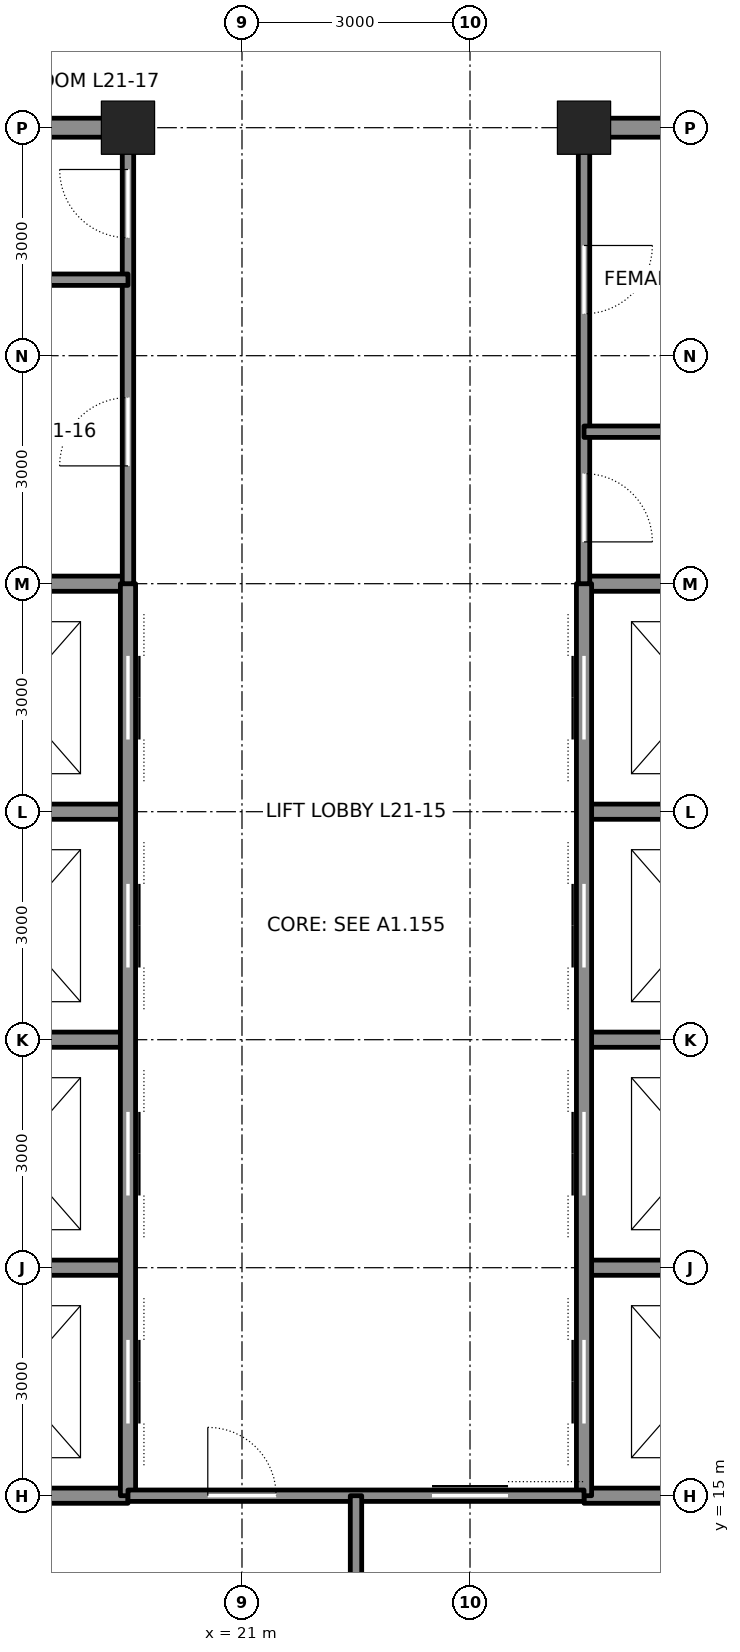
"""IFC4 building model, lengths in metres.
Left out: names, types, materials, properties, quantities, classifications, styles, units other than length and angle.
Written with IfcOpenShell. Run it as: python <this file> out.ifc"""

import sys

from ifc_helpers import new_model, si_unit, direction, frame, frame_2d, origin, origin_2d, place, context, subcontext, project, spatial, rectangle, hollow_rectangle, extrude, element, fill, save


model = new_model("IFC4")
c1 = context("Model", 3, precision=1e-05, world=origin(), true_north=direction((0.0, 1.0)))
c2 = subcontext(c1, "Body", "Model", "MODEL_VIEW")
j1 = project(units=[si_unit("LENGTHUNIT", "METRE"), si_unit("PLANEANGLEUNIT", "RADIAN")], contexts=[c1])
p1 = place(None, origin())
s1 = spatial("IfcSite", under=j1, at=p1, CompositionType="ELEMENT")
p2 = place(p1, origin())
s2 = spatial("IfcBuilding", under=s1, at=p2, CompositionType="ELEMENT")
p3 = place(p2, frame((0.0, 0.0, 102.3)))
s3 = spatial("IfcBuildingStorey", under=s2, at=p3, CompositionType="ELEMENT", Elevation=102.3)
for number, where, z_axis, x_axis in (
    (1, (19.5, 33.0, 0.0), (0.0, 0.0, 1.0), (1.0, 0.0, 0.0)),
    (2, (25.5, 33.0, 0.0), (0.0, 0.0, 1.0), (1.0, 0.0, 0.0)),
):
    element("IfcColumn", number, at=place(p3, frame(where, z_axis=z_axis, x_axis=x_axis)), inside=s3, PredefinedType="COLUMN", context=c2, shape_type="SweptSolid", body=[
        extrude(hollow_rectangle(XDim=0.7, YDim=0.7, WallThickness=0.07, at=origin_2d()), origin(), (0.0, 0.0, 1.0), 4.5),
    ])
for number, where, z_axis, x_axis in (
    (3, (12.0, 15.0, 0.0), (0.0, 0.0, 1.0), (1.0, 0.0, 0.0)),
    (4, (25.5, 15.0, 0.0), (0.0, 0.0, 1.0), (1.0, 0.0, 0.0)),
):
    element("IfcWall", number, at=place(p3, frame(where, z_axis=z_axis, x_axis=x_axis)), inside=s3, PredefinedType="SOLIDWALL", context=c2, shape_type="SweptSolid", body=[
        extrude(rectangle(XDim=7.5, YDim=0.2, at=frame_2d((3.75, 0.0))), origin(), (0.0, 0.0, 1.0), 4.34),
    ])
for number, where, z_axis, x_axis in (
    (5, (16.75, 24.0, 0.0), (0.0, 0.0, 1.0), (1.0, 0.0, 0.0)),
    (6, (25.5, 24.0, 0.0), (0.0, 0.0, 1.0), (1.0, 0.0, 0.0)),
):
    element("IfcWall", number, at=place(p3, frame(where, z_axis=z_axis, x_axis=x_axis)), inside=s3, PredefinedType="SOLIDWALL", context=c2, shape_type="SweptSolid", body=[
        extrude(rectangle(XDim=2.75, YDim=0.2, at=frame_2d((1.375, 0.0))), origin(), (0.0, 0.0, 1.0), 3.39),
    ])
p4 = place(p3, frame((12.0, 27.0, 0.0), z_axis=(0.0, 0.0, 1.0), x_axis=(1.0, 0.0, 0.0)))
e7 = element("IfcWall", 7, at=p4, inside=s3, PredefinedType="SOLIDWALL", context=c2, shape_type="SweptSolid", body=[
    extrude(rectangle(XDim=7.5, YDim=0.2, at=frame_2d((3.75, 0.0))), origin(), (0.0, 0.0, 1.0), 4.34),
])
p5 = place(p4, frame((1.65, 0.0, 0.0)))
e8 = element("IfcOpeningElement", 8, at=p5, cuts=e7, PredefinedType="OPENING", context=c2, shape_type="SweptSolid", body=[
    extrude(rectangle(XDim=1.2, YDim=2.1, at=frame_2d((0.6, 1.05))), frame((0.0, 0.11, 0.0), z_axis=(0.0, -1.0, 0.0), x_axis=(1.0, 0.0, 0.0)), (0.0, 0.0, 1.0), 0.22),
])
p6 = place(p3, frame((25.5, 27.0, 0.0), z_axis=(0.0, 0.0, 1.0), x_axis=(1.0, 0.0, 0.0)))
e9 = element("IfcWall", 9, at=p6, inside=s3, PredefinedType="SOLIDWALL", context=c2, shape_type="SweptSolid", body=[
    extrude(rectangle(XDim=3.0, YDim=0.2, at=frame_2d((1.5, 0.0))), origin(), (0.0, 0.0, 1.0), 4.34),
])
for number, where, z_axis, x_axis in (
    (10, (16.75, 33.0, 0.0), (0.0, 0.0, 1.0), (1.0, 0.0, 0.0)),
    (11, (25.75, 33.0, 0.0), (0.0, 0.0, 1.0), (1.0, 0.0, 0.0)),
):
    element("IfcWall", number, at=place(p3, frame(where, z_axis=z_axis, x_axis=x_axis)), inside=s3, PredefinedType="SOLIDWALL", context=c2, shape_type="SweptSolid", body=[
        extrude(rectangle(XDim=2.5, YDim=0.25, at=frame_2d((1.25, 0.0))), origin(), (0.0, 0.0, 1.0), 3.481),
    ])
p7 = place(p3, frame((16.5, 18.0, 0.0), z_axis=(0.0, 0.0, 1.0), x_axis=(1.0, 0.0, 0.0)))
e12 = element("IfcWall", 12, at=p7, inside=s3, PredefinedType="SOLIDWALL", context=c2, shape_type="SweptSolid", body=[
    extrude(rectangle(XDim=3.0, YDim=0.2, at=frame_2d((1.5, 0.0))), origin(), (0.0, 0.0, 1.0), 4.34),
])
p8 = place(p3, frame((25.5, 18.0, 0.0), z_axis=(0.0, 0.0, 1.0), x_axis=(1.0, 0.0, 0.0)))
e13 = element("IfcWall", 13, at=p8, inside=s3, PredefinedType="SOLIDWALL", context=c2, shape_type="SweptSolid", body=[
    extrude(rectangle(XDim=7.5, YDim=0.2, at=frame_2d((3.75, 0.0))), origin(), (0.0, 0.0, 1.0), 4.34),
])
p9 = place(p8, frame((4.65, 0.0, 0.0)))
e14 = element("IfcOpeningElement", 14, at=p9, cuts=e13, PredefinedType="OPENING", context=c2, shape_type="SweptSolid", body=[
    extrude(rectangle(XDim=1.2, YDim=2.1, at=frame_2d((0.6, 1.05))), frame((0.0, 0.11, 0.0), z_axis=(0.0, -1.0, 0.0), x_axis=(1.0, 0.0, 0.0)), (0.0, 0.0, 1.0), 0.22),
])
for number, where, z_axis, x_axis in (
    (15, (16.75, 21.0, 0.0), (0.0, 0.0, 1.0), (1.0, 0.0, 0.0)),
    (16, (25.5, 21.0, 0.0), (0.0, 0.0, 1.0), (1.0, 0.0, 0.0)),
):
    element("IfcWall", number, at=place(p3, frame(where, z_axis=z_axis, x_axis=x_axis)), inside=s3, PredefinedType="SOLIDWALL", context=c2, shape_type="SweptSolid", body=[
        extrude(rectangle(XDim=2.75, YDim=0.2, at=frame_2d((1.375, 0.0))), origin(), (0.0, 0.0, 1.0), 3.39),
    ])
p10 = place(p3, frame((19.5, 15.0, 0.0), z_axis=(0.0, 0.0, 1.0), x_axis=(0.0, 1.0, 0.0)))
e17 = element("IfcWall", 17, at=p10, inside=s3, PredefinedType="SOLIDWALL", context=c2, shape_type="SweptSolid", body=[
    extrude(rectangle(XDim=12.0, YDim=0.2, at=frame_2d((6.0, 0.0))), origin(), (0.0, 0.0, 1.0), 3.365),
])
p11 = place(p10, frame((0.95, 0.0, 0.0)))
e18 = element("IfcOpeningElement", 18, at=p11, cuts=e17, PredefinedType="OPENING", context=c2, shape_type="SweptSolid", body=[
    extrude(rectangle(XDim=1.1, YDim=2.1, at=frame_2d((0.55, 1.05))), frame((0.0, 0.11, 0.0), z_axis=(0.0, -1.0, 0.0), x_axis=(1.0, 0.0, 0.0)), (0.0, 0.0, 1.0), 0.22),
])
p12 = place(p10, frame((3.95, 0.0, 0.0)))
e19 = element("IfcOpeningElement", 19, at=p12, cuts=e17, PredefinedType="OPENING", context=c2, shape_type="SweptSolid", body=[
    extrude(rectangle(XDim=1.1, YDim=2.1, at=frame_2d((0.55, 1.05))), frame((0.0, 0.11, 0.0), z_axis=(0.0, -1.0, 0.0), x_axis=(1.0, 0.0, 0.0)), (0.0, 0.0, 1.0), 0.22),
])
p13 = place(p10, frame((6.95, 0.0, 0.0)))
e20 = element("IfcOpeningElement", 20, at=p13, cuts=e17, PredefinedType="OPENING", context=c2, shape_type="SweptSolid", body=[
    extrude(rectangle(XDim=1.1, YDim=2.1, at=frame_2d((0.55, 1.05))), frame((0.0, 0.11, 0.0), z_axis=(0.0, -1.0, 0.0), x_axis=(1.0, 0.0, 0.0)), (0.0, 0.0, 1.0), 0.22),
])
p14 = place(p10, frame((9.95, 0.0, 0.0)))
e21 = element("IfcOpeningElement", 21, at=p14, cuts=e17, PredefinedType="OPENING", context=c2, shape_type="SweptSolid", body=[
    extrude(rectangle(XDim=1.1, YDim=2.1, at=frame_2d((0.55, 1.05))), frame((0.0, 0.11, 0.0), z_axis=(0.0, -1.0, 0.0), x_axis=(1.0, 0.0, 0.0)), (0.0, 0.0, 1.0), 0.22),
])
p15 = place(p3, frame((19.5, 27.0, 0.0), z_axis=(0.0, 0.0, 1.0), x_axis=(0.0, 1.0, 0.0)))
e22 = element("IfcWall", 22, at=p15, inside=s3, PredefinedType="PARTITIONING", context=c2, shape_type="SweptSolid", body=[
    extrude(rectangle(XDim=5.75, YDim=0.15, at=frame_2d((2.875, 0.0))), origin(), (0.0, 0.0, 1.0), 3.365),
])
p16 = place(p15, frame((1.55, 0.0, 0.0)))
e23 = element("IfcOpeningElement", 23, at=p16, cuts=e22, PredefinedType="OPENING", context=c2, shape_type="SweptSolid", body=[
    extrude(rectangle(XDim=0.9, YDim=2.1, at=frame_2d((0.45, 1.05))), frame((0.0, 0.085, 0.0), z_axis=(0.0, -1.0, 0.0), x_axis=(1.0, 0.0, 0.0)), (0.0, 0.0, 1.0), 0.17),
])
p17 = place(p15, frame((4.55, 0.0, 0.0)))
e24 = element("IfcOpeningElement", 24, at=p17, cuts=e22, PredefinedType="OPENING", context=c2, shape_type="SweptSolid", body=[
    extrude(rectangle(XDim=0.9, YDim=2.1, at=frame_2d((0.45, 1.05))), frame((0.0, 0.085, 0.0), z_axis=(0.0, -1.0, 0.0), x_axis=(1.0, 0.0, 0.0)), (0.0, 0.0, 1.0), 0.17),
])
p18 = place(p3, frame((25.5, 15.0, 0.0), z_axis=(0.0, 0.0, 1.0), x_axis=(0.0, 1.0, 0.0)))
e25 = element("IfcWall", 25, at=p18, inside=s3, PredefinedType="SOLIDWALL", context=c2, shape_type="SweptSolid", body=[
    extrude(rectangle(XDim=12.0, YDim=0.2, at=frame_2d((6.0, 0.0))), origin(), (0.0, 0.0, 1.0), 3.365),
])
p19 = place(p18, frame((0.95, 0.0, 0.0)))
e26 = element("IfcOpeningElement", 26, at=p19, cuts=e25, PredefinedType="OPENING", context=c2, shape_type="SweptSolid", body=[
    extrude(rectangle(XDim=1.1, YDim=2.1, at=frame_2d((0.55, 1.05))), frame((0.0, 0.11, 0.0), z_axis=(0.0, -1.0, 0.0), x_axis=(1.0, 0.0, 0.0)), (0.0, 0.0, 1.0), 0.22),
])
p20 = place(p18, frame((3.95, 0.0, 0.0)))
e27 = element("IfcOpeningElement", 27, at=p20, cuts=e25, PredefinedType="OPENING", context=c2, shape_type="SweptSolid", body=[
    extrude(rectangle(XDim=1.1, YDim=2.1, at=frame_2d((0.55, 1.05))), frame((0.0, 0.11, 0.0), z_axis=(0.0, -1.0, 0.0), x_axis=(1.0, 0.0, 0.0)), (0.0, 0.0, 1.0), 0.22),
])
p21 = place(p18, frame((6.95, 0.0, 0.0)))
e28 = element("IfcOpeningElement", 28, at=p21, cuts=e25, PredefinedType="OPENING", context=c2, shape_type="SweptSolid", body=[
    extrude(rectangle(XDim=1.1, YDim=2.1, at=frame_2d((0.55, 1.05))), frame((0.0, 0.11, 0.0), z_axis=(0.0, -1.0, 0.0), x_axis=(1.0, 0.0, 0.0)), (0.0, 0.0, 1.0), 0.22),
])
p22 = place(p18, frame((9.95, 0.0, 0.0)))
e29 = element("IfcOpeningElement", 29, at=p22, cuts=e25, PredefinedType="OPENING", context=c2, shape_type="SweptSolid", body=[
    extrude(rectangle(XDim=1.1, YDim=2.1, at=frame_2d((0.55, 1.05))), frame((0.0, 0.11, 0.0), z_axis=(0.0, -1.0, 0.0), x_axis=(1.0, 0.0, 0.0)), (0.0, 0.0, 1.0), 0.22),
])
p23 = place(p3, frame((25.5, 27.0, 0.0), z_axis=(0.0, 0.0, 1.0), x_axis=(0.0, 1.0, 0.0)))
e30 = element("IfcWall", 30, at=p23, inside=s3, PredefinedType="PARTITIONING", context=c2, shape_type="SweptSolid", body=[
    extrude(rectangle(XDim=5.75, YDim=0.15, at=frame_2d((2.875, 0.0))), origin(), (0.0, 0.0, 1.0), 3.365),
])
p24 = place(p23, frame((0.55, 0.0, 0.0)))
e31 = element("IfcOpeningElement", 31, at=p24, cuts=e30, PredefinedType="OPENING", context=c2, shape_type="SweptSolid", body=[
    extrude(rectangle(XDim=0.9, YDim=2.1, at=frame_2d((0.45, 1.05))), frame((0.0, 0.085, 0.0), z_axis=(0.0, -1.0, 0.0), x_axis=(1.0, 0.0, 0.0)), (0.0, 0.0, 1.0), 0.17),
])
p25 = place(p23, frame((3.55, 0.0, 0.0)))
e32 = element("IfcOpeningElement", 32, at=p25, cuts=e30, PredefinedType="OPENING", context=c2, shape_type="SweptSolid", body=[
    extrude(rectangle(XDim=0.9, YDim=2.1, at=frame_2d((0.45, 1.05))), frame((0.0, 0.085, 0.0), z_axis=(0.0, -1.0, 0.0), x_axis=(1.0, 0.0, 0.0)), (0.0, 0.0, 1.0), 0.17),
])
p26 = place(p3, frame((19.5, 15.0, 0.0), z_axis=(0.0, 0.0, 1.0), x_axis=(1.0, 0.0, 0.0)))
e33 = element("IfcWall", 33, at=p26, inside=s3, PredefinedType="PARTITIONING", context=c2, shape_type="SweptSolid", body=[
    extrude(rectangle(XDim=6.0, YDim=0.15, at=frame_2d((3.0, 0.0))), origin(), (0.0, 0.0, 1.0), 4.34),
])
p27 = place(p26, frame((4.0, 0.0, 0.0)))
e34 = element("IfcOpeningElement", 34, at=p27, cuts=e33, PredefinedType="OPENING", context=c2, shape_type="SweptSolid", body=[
    extrude(rectangle(XDim=1.0, YDim=2.1, at=frame_2d((0.5, 1.05))), frame((0.0, 0.085, 0.0), z_axis=(0.0, -1.0, 0.0), x_axis=(1.0, 0.0, 0.0)), (0.0, 0.0, 1.0), 0.17),
])
p28 = place(p26, frame((1.05, 0.0, 0.0)))
e35 = element("IfcOpeningElement", 35, at=p28, cuts=e33, PredefinedType="OPENING", context=c2, shape_type="SweptSolid", body=[
    extrude(rectangle(XDim=0.9, YDim=2.1, at=frame_2d((0.45, 1.05))), frame((0.0, 0.085, 0.0), z_axis=(0.0, -1.0, 0.0), x_axis=(1.0, 0.0, 0.0)), (0.0, 0.0, 1.0), 0.17),
])
for number, where, z_axis, x_axis in (
    (36, (22.5, 15.0, 0.0), (0.0, 0.0, 1.0), (0.0, -1.0, 0.0)),
    (37, (16.5, 31.0, 0.0), (0.0, 0.0, 1.0), (1.0, 0.0, 0.0)),
    (38, (25.5, 29.0, 0.0), (0.0, 0.0, 1.0), (1.0, 0.0, 0.0)),
):
    element("IfcWall", number, at=place(p3, frame(where, z_axis=z_axis, x_axis=x_axis)), inside=s3, PredefinedType="PARTITIONING", context=c2, shape_type="SweptSolid", body=[
        extrude(rectangle(XDim=3.0, YDim=0.15, at=frame_2d((1.5, 0.0))), origin(), (0.0, 0.0, 1.0), 4.34),
    ])
p29 = place(p16, origin())
e39 = element("IfcDoor", 39, at=p29, inside=s3, OperationType="SINGLE_SWING_LEFT", PredefinedType="DOOR", context=c2, shape_type="SweptSolid", body=[
    extrude(rectangle(XDim=0.9, YDim=2.1, at=frame_2d((0.45, 1.05))), frame((0.0, 0.025, 0.0), z_axis=(0.0, -1.0, 0.0), x_axis=(1.0, 0.0, 0.0)), (0.0, 0.0, 1.0), 0.05),
])
fill(e23, e39)
p30 = place(p17, origin())
e40 = element("IfcDoor", 40, at=p30, inside=s3, OperationType="SINGLE_SWING_RIGHT", PredefinedType="DOOR", context=c2, shape_type="SweptSolid", body=[
    extrude(rectangle(XDim=0.9, YDim=2.1, at=frame_2d((0.45, 1.05))), frame((0.0, 0.025, 0.0), z_axis=(0.0, -1.0, 0.0), x_axis=(1.0, 0.0, 0.0)), (0.0, 0.0, 1.0), 0.05),
])
fill(e24, e40)
p31 = place(p24, frame((0.9, 0.0, 0.0), z_axis=(0.0, 0.0, 1.0), x_axis=(-1.0, 0.0, 0.0)))
e41 = element("IfcDoor", 41, at=p31, inside=s3, OperationType="SINGLE_SWING_RIGHT", PredefinedType="DOOR", context=c2, shape_type="SweptSolid", body=[
    extrude(rectangle(XDim=0.9, YDim=2.1, at=frame_2d((0.45, 1.05))), frame((0.0, 0.025, 0.0), z_axis=(0.0, -1.0, 0.0), x_axis=(1.0, 0.0, 0.0)), (0.0, 0.0, 1.0), 0.05),
])
fill(e31, e41)
p32 = place(p25, frame((0.9, 0.0, 0.0), z_axis=(0.0, 0.0, 1.0), x_axis=(-1.0, 0.0, 0.0)))
e42 = element("IfcDoor", 42, at=p32, inside=s3, OperationType="SINGLE_SWING_LEFT", PredefinedType="DOOR", context=c2, shape_type="SweptSolid", body=[
    extrude(rectangle(XDim=0.9, YDim=2.1, at=frame_2d((0.45, 1.05))), frame((0.0, 0.025, 0.0), z_axis=(0.0, -1.0, 0.0), x_axis=(1.0, 0.0, 0.0)), (0.0, 0.0, 1.0), 0.05),
])
fill(e32, e42)
p33 = place(p27, origin())
e43 = element("IfcDoor", 43, at=p33, inside=s3, OperationType="SLIDING_TO_LEFT", PredefinedType="DOOR", context=c2, shape_type="SweptSolid", body=[
    extrude(rectangle(XDim=1.0, YDim=2.1, at=frame_2d((0.5, 1.05))), frame((0.0, 0.025, 0.0), z_axis=(0.0, -1.0, 0.0), x_axis=(1.0, 0.0, 0.0)), (0.0, 0.0, 1.0), 0.05),
])
fill(e34, e43)
p34 = place(p28, origin())
e44 = element("IfcDoor", 44, at=p34, inside=s3, OperationType="SINGLE_SWING_LEFT", PredefinedType="DOOR", context=c2, shape_type="SweptSolid", body=[
    extrude(rectangle(XDim=0.9, YDim=2.1, at=frame_2d((0.45, 1.05))), frame((0.0, 0.025, 0.0), z_axis=(0.0, -1.0, 0.0), x_axis=(1.0, 0.0, 0.0)), (0.0, 0.0, 1.0), 0.05),
])
fill(e35, e44)
p35 = place(p11, origin())
e45 = element("IfcDoor", 45, at=p35, inside=s3, OperationType="DOUBLE_DOOR_SLIDING", PredefinedType="DOOR", context=c2, shape_type="SweptSolid", body=[
    extrude(rectangle(XDim=1.1, YDim=2.1, at=frame_2d((0.55, 1.05))), frame((0.0, 0.025, 0.0), z_axis=(0.0, -1.0, 0.0), x_axis=(1.0, 0.0, 0.0)), (0.0, 0.0, 1.0), 0.05),
])
fill(e18, e45)
p36 = place(p19, origin())
e46 = element("IfcDoor", 46, at=p36, inside=s3, OperationType="DOUBLE_DOOR_SLIDING", PredefinedType="DOOR", context=c2, shape_type="SweptSolid", body=[
    extrude(rectangle(XDim=1.1, YDim=2.1, at=frame_2d((0.55, 1.05))), frame((0.0, 0.025, 0.0), z_axis=(0.0, -1.0, 0.0), x_axis=(1.0, 0.0, 0.0)), (0.0, 0.0, 1.0), 0.05),
])
fill(e26, e46)
p37 = place(p12, origin())
e47 = element("IfcDoor", 47, at=p37, inside=s3, OperationType="DOUBLE_DOOR_SLIDING", PredefinedType="DOOR", context=c2, shape_type="SweptSolid", body=[
    extrude(rectangle(XDim=1.1, YDim=2.1, at=frame_2d((0.55, 1.05))), frame((0.0, 0.025, 0.0), z_axis=(0.0, -1.0, 0.0), x_axis=(1.0, 0.0, 0.0)), (0.0, 0.0, 1.0), 0.05),
])
fill(e19, e47)
p38 = place(p20, origin())
e48 = element("IfcDoor", 48, at=p38, inside=s3, OperationType="DOUBLE_DOOR_SLIDING", PredefinedType="DOOR", context=c2, shape_type="SweptSolid", body=[
    extrude(rectangle(XDim=1.1, YDim=2.1, at=frame_2d((0.55, 1.05))), frame((0.0, 0.025, 0.0), z_axis=(0.0, -1.0, 0.0), x_axis=(1.0, 0.0, 0.0)), (0.0, 0.0, 1.0), 0.05),
])
fill(e27, e48)
p39 = place(p13, origin())
e49 = element("IfcDoor", 49, at=p39, inside=s3, OperationType="DOUBLE_DOOR_SLIDING", PredefinedType="DOOR", context=c2, shape_type="SweptSolid", body=[
    extrude(rectangle(XDim=1.1, YDim=2.1, at=frame_2d((0.55, 1.05))), frame((0.0, 0.025, 0.0), z_axis=(0.0, -1.0, 0.0), x_axis=(1.0, 0.0, 0.0)), (0.0, 0.0, 1.0), 0.05),
])
fill(e20, e49)
p40 = place(p21, origin())
e50 = element("IfcDoor", 50, at=p40, inside=s3, OperationType="DOUBLE_DOOR_SLIDING", PredefinedType="DOOR", context=c2, shape_type="SweptSolid", body=[
    extrude(rectangle(XDim=1.1, YDim=2.1, at=frame_2d((0.55, 1.05))), frame((0.0, 0.025, 0.0), z_axis=(0.0, -1.0, 0.0), x_axis=(1.0, 0.0, 0.0)), (0.0, 0.0, 1.0), 0.05),
])
fill(e28, e50)
p41 = place(p14, origin())
e51 = element("IfcDoor", 51, at=p41, inside=s3, OperationType="DOUBLE_DOOR_SLIDING", PredefinedType="DOOR", context=c2, shape_type="SweptSolid", body=[
    extrude(rectangle(XDim=1.1, YDim=2.1, at=frame_2d((0.55, 1.05))), frame((0.0, 0.025, 0.0), z_axis=(0.0, -1.0, 0.0), x_axis=(1.0, 0.0, 0.0)), (0.0, 0.0, 1.0), 0.05),
])
fill(e21, e51)
p42 = place(p22, origin())
e52 = element("IfcDoor", 52, at=p42, inside=s3, OperationType="DOUBLE_DOOR_SLIDING", PredefinedType="DOOR", context=c2, shape_type="SweptSolid", body=[
    extrude(rectangle(XDim=1.1, YDim=2.1, at=frame_2d((0.55, 1.05))), frame((0.0, 0.025, 0.0), z_axis=(0.0, -1.0, 0.0), x_axis=(1.0, 0.0, 0.0)), (0.0, 0.0, 1.0), 0.05),
])
fill(e29, e52)
save(model, sys.argv[1])
